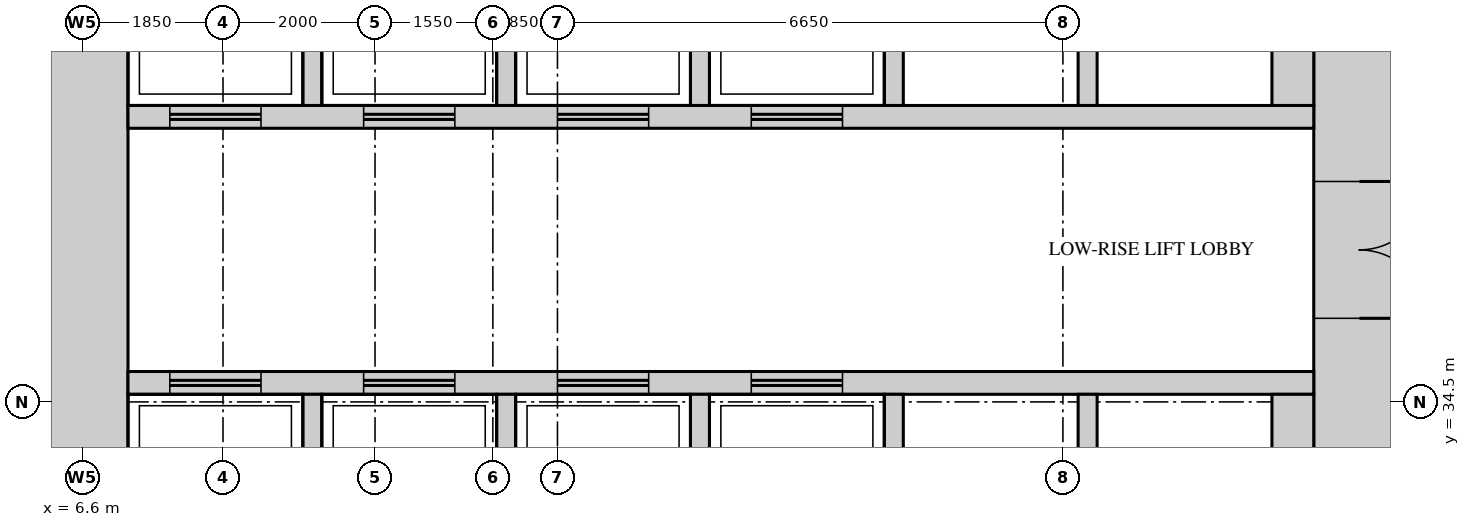
"""IFC4 building model, lengths in metres.
Left out: names, types, materials, properties, quantities, classifications, styles, units other than length and angle.
Written with IfcOpenShell. Run it as: python <this file> out.ifc"""

import sys

from ifc_helpers import new_model, si_unit, direction, frame, frame_2d, origin, place, context, subcontext, project, spatial, rectangle, extrude, source, transform, mapped, element, fill, save


model = new_model("IFC4")
c1 = context("Model", 3, precision=1e-05, world=origin(), true_north=direction((0.0, 1.0)))
c2 = subcontext(c1, "Body", "Model", "MODEL_VIEW")
j1 = project(units=[si_unit("LENGTHUNIT", "METRE"), si_unit("PLANEANGLEUNIT", "RADIAN")], contexts=[c1])
p1 = place(None, origin())
s1 = spatial("IfcSite", under=j1, at=p1, CompositionType="ELEMENT")
p2 = place(p1, origin())
s2 = spatial("IfcBuilding", under=s1, at=p2, CompositionType="ELEMENT")
p3 = place(p2, frame((0.0, 0.0, 33.0)))
s3 = spatial("IfcBuildingStorey", under=s2, at=p3, CompositionType="ELEMENT", Elevation=33.0)
m1 = source(origin(), c2, "Body", "SweptSolid", [
    extrude(rectangle(XDim=27.6, YDim=1.2, at=frame_2d((13.8, 0.0))), origin(), (0.0, 0.0, 1.0), 4.2),
])
p4 = place(p3, frame((23.4, 13.2, 0.0), z_axis=(0.0, 0.0, 1.0), x_axis=(0.0, 1.0, 0.0)))
e1 = element("IfcWall", 1, at=p4, inside=s3, PredefinedType="SHEAR", context=c2, shape_type="MappedRepresentation", body=[
    mapped(m1, transform((0.0, 0.0, 0.0))),
])
m2 = source(origin(), c2, "Body", "SweptSolid", [
    extrude(rectangle(XDim=1.8, YDim=2.1, at=frame_2d((0.9, 1.05))), frame((0.0, 0.61, 0.0), z_axis=(0.0, -1.0, 0.0), x_axis=(1.0, 0.0, 0.0)), (0.0, 0.0, 1.0), 1.22),
])
p5 = place(p4, frame((22.4, 0.0, 0.0)))
e2 = element("IfcOpeningElement", 2, at=p5, cuts=e1, PredefinedType="OPENING", context=c2, shape_type="MappedRepresentation", body=[
    mapped(m2, transform((0.0, 0.0, 0.0))),
])
m3 = source(origin(), c2, "Body", "SweptSolid", [
    extrude(rectangle(XDim=1.2, YDim=2.1, at=frame_2d((0.6, 1.05))), frame((0.0, 0.61, 0.0), z_axis=(0.0, -1.0, 0.0), x_axis=(1.0, 0.0, 0.0)), (0.0, 0.0, 1.0), 1.22),
])
p6 = place(p4, frame((13.65, 0.0, 0.0)))
e3 = element("IfcOpeningElement", 3, at=p6, cuts=e1, PredefinedType="OPENING", context=c2, shape_type="MappedRepresentation", body=[
    mapped(m3, transform((0.0, 0.0, 0.0))),
])
m4 = source(origin(), c2, "Body", "SweptSolid", [
    extrude(rectangle(XDim=0.9, YDim=2.1, at=frame_2d((0.45, 1.05))), frame((0.0, 0.61, 0.0), z_axis=(0.0, -1.0, 0.0), x_axis=(1.0, 0.0, 0.0)), (0.0, 0.0, 1.0), 1.22),
])
p7 = place(p4, frame((1.95, 0.0, 0.0)))
e4 = element("IfcOpeningElement", 4, at=p7, cuts=e1, PredefinedType="OPENING", context=c2, shape_type="MappedRepresentation", body=[
    mapped(m4, transform((0.0, 0.0, 0.0))),
])
p8 = place(p4, frame((6.8, 0.0, 0.0)))
e5 = element("IfcOpeningElement", 5, at=p8, cuts=e1, PredefinedType="OPENING", context=c2, shape_type="MappedRepresentation", body=[
    mapped(m4, transform((0.0, 0.0, 0.0))),
])
p9 = place(p3, frame((6.6, 13.2, 0.0), z_axis=(0.0, 0.0, 1.0), x_axis=(0.0, 1.0, 0.0)))
e6 = element("IfcWall", 6, at=p9, inside=s3, PredefinedType="SHEAR", context=c2, shape_type="MappedRepresentation", body=[
    mapped(m1, transform((0.0, 0.0, 0.0))),
])
m5 = source(origin(), c2, "Body", "SweptSolid", [
    extrude(rectangle(XDim=15.6, YDim=0.3, at=frame_2d((7.8, 0.0))), origin(), (0.0, 0.0, 1.0), 4.2),
])
p10 = place(p3, frame((7.2, 38.25, 0.0), z_axis=(0.0, 0.0, 1.0), x_axis=(1.0, 0.0, 0.0)))
e7 = element("IfcWall", 7, at=p10, inside=s3, PredefinedType="STANDARD", context=c2, shape_type="MappedRepresentation", body=[
    mapped(m5, transform((0.0, 0.0, 0.0))),
])
m6 = source(origin(), c2, "Body", "SweptSolid", [
    extrude(rectangle(XDim=1.2, YDim=2.1, at=frame_2d((0.6, 1.05))), frame((0.0, 0.16, 0.0), z_axis=(0.0, -1.0, 0.0), x_axis=(1.0, 0.0, 0.0)), (0.0, 0.0, 1.0), 0.32),
])
p11 = place(p10, frame((0.55, 0.0, 0.0)))
e8 = element("IfcOpeningElement", 8, at=p11, cuts=e7, PredefinedType="OPENING", context=c2, shape_type="MappedRepresentation", body=[
    mapped(m6, transform((0.0, 0.0, 0.0))),
])
p12 = place(p10, frame((3.1, 0.0, 0.0)))
e9 = element("IfcOpeningElement", 9, at=p12, cuts=e7, PredefinedType="OPENING", context=c2, shape_type="MappedRepresentation", body=[
    mapped(m6, transform((0.0, 0.0, 0.0))),
])
p13 = place(p10, frame((5.65, 0.0, 0.0)))
e10 = element("IfcOpeningElement", 10, at=p13, cuts=e7, PredefinedType="OPENING", context=c2, shape_type="MappedRepresentation", body=[
    mapped(m6, transform((0.0, 0.0, 0.0))),
])
p14 = place(p10, frame((8.2, 0.0, 0.0)))
e11 = element("IfcOpeningElement", 11, at=p14, cuts=e7, PredefinedType="OPENING", context=c2, shape_type="MappedRepresentation", body=[
    mapped(m6, transform((0.0, 0.0, 0.0))),
])
p15 = place(p3, frame((7.2, 34.75, 0.0), z_axis=(0.0, 0.0, 1.0), x_axis=(1.0, 0.0, 0.0)))
e12 = element("IfcWall", 12, at=p15, inside=s3, PredefinedType="STANDARD", context=c2, shape_type="MappedRepresentation", body=[
    mapped(m5, transform((0.0, 0.0, 0.0))),
])
p16 = place(p15, frame((0.55, 0.0, 0.0)))
e13 = element("IfcOpeningElement", 13, at=p16, cuts=e12, PredefinedType="OPENING", context=c2, shape_type="MappedRepresentation", body=[
    mapped(m6, transform((0.0, 0.0, 0.0))),
])
p17 = place(p15, frame((3.1, 0.0, 0.0)))
e14 = element("IfcOpeningElement", 14, at=p17, cuts=e12, PredefinedType="OPENING", context=c2, shape_type="MappedRepresentation", body=[
    mapped(m6, transform((0.0, 0.0, 0.0))),
])
p18 = place(p15, frame((5.65, 0.0, 0.0)))
e15 = element("IfcOpeningElement", 15, at=p18, cuts=e12, PredefinedType="OPENING", context=c2, shape_type="MappedRepresentation", body=[
    mapped(m6, transform((0.0, 0.0, 0.0))),
])
p19 = place(p15, frame((8.2, 0.0, 0.0)))
e16 = element("IfcOpeningElement", 16, at=p19, cuts=e12, PredefinedType="OPENING", context=c2, shape_type="MappedRepresentation", body=[
    mapped(m6, transform((0.0, 0.0, 0.0))),
])
m7 = source(origin(), c2, "Body", "SweptSolid", [
    extrude(rectangle(XDim=2.4, YDim=0.25, at=frame_2d((1.2, 0.0))), origin(), (0.0, 0.0, 1.0), 4.2),
])
for number, where, z_axis, x_axis in (
    (17, (9.625, 38.4, 0.0), (0.0, 0.0, 1.0), (0.0, 1.0, 0.0)),
    (18, (12.175, 38.4, 0.0), (0.0, 0.0, 1.0), (0.0, 1.0, 0.0)),
    (19, (14.725, 38.4, 0.0), (0.0, 0.0, 1.0), (0.0, 1.0, 0.0)),
    (20, (17.275, 38.4, 0.0), (0.0, 0.0, 1.0), (0.0, 1.0, 0.0)),
    (21, (19.825, 38.4, 0.0), (0.0, 0.0, 1.0), (0.0, 1.0, 0.0)),
):
    element("IfcWall", number, at=place(p3, frame(where, z_axis=z_axis, x_axis=x_axis)), inside=s3, PredefinedType="STANDARD", context=c2, shape_type="MappedRepresentation", body=[
        mapped(m7, transform((0.0, 0.0, 0.0))),
    ])
m8 = source(origin(), c2, "Body", "SweptSolid", [
    extrude(rectangle(XDim=2.4, YDim=0.55, at=frame_2d((1.2, 0.0))), origin(), (0.0, 0.0, 1.0), 4.2),
])
p20 = place(p3, frame((22.525, 38.4, 0.0), z_axis=(0.0, 0.0, 1.0), x_axis=(0.0, 1.0, 0.0)))
e22 = element("IfcWall", 22, at=p20, inside=s3, PredefinedType="STANDARD", context=c2, shape_type="MappedRepresentation", body=[
    mapped(m8, transform((0.0, 0.0, 0.0))),
])
for number, where, z_axis, x_axis in (
    (23, (9.625, 32.2, 0.0), (0.0, 0.0, 1.0), (0.0, 1.0, 0.0)),
    (24, (12.175, 32.2, 0.0), (0.0, 0.0, 1.0), (0.0, 1.0, 0.0)),
    (25, (14.725, 32.2, 0.0), (0.0, 0.0, 1.0), (0.0, 1.0, 0.0)),
    (26, (17.275, 32.2, 0.0), (0.0, 0.0, 1.0), (0.0, 1.0, 0.0)),
    (27, (19.825, 32.2, 0.0), (0.0, 0.0, 1.0), (0.0, 1.0, 0.0)),
):
    element("IfcWall", number, at=place(p3, frame(where, z_axis=z_axis, x_axis=x_axis)), inside=s3, PredefinedType="STANDARD", context=c2, shape_type="MappedRepresentation", body=[
        mapped(m7, transform((0.0, 0.0, 0.0))),
    ])
p21 = place(p3, frame((22.525, 32.2, 0.0), z_axis=(0.0, 0.0, 1.0), x_axis=(0.0, 1.0, 0.0)))
e28 = element("IfcWall", 28, at=p21, inside=s3, PredefinedType="STANDARD", context=c2, shape_type="MappedRepresentation", body=[
    mapped(m8, transform((0.0, 0.0, 0.0))),
])
m9 = source(origin(), c2, "Body", "SweptSolid", [
    extrude(rectangle(XDim=1.8, YDim=2.1, at=frame_2d((0.9, 1.05))), frame((0.0, 0.55, 0.0), z_axis=(0.0, -1.0, 0.0), x_axis=(1.0, 0.0, 0.0)), (0.0, 0.0, 1.0), 1.1),
])
p22 = place(p5, origin())
e29 = element("IfcDoor", 29, at=p22, inside=s3, OperationType="DOUBLE_DOOR_SINGLE_SWING", PredefinedType="DOOR", context=c2, shape_type="MappedRepresentation", body=[
    mapped(m9, transform((0.0, 0.0, 0.0))),
])
fill(e2, e29)
m10 = source(origin(), c2, "Body", "SweptSolid", [
    extrude(rectangle(XDim=1.2, YDim=2.1, at=frame_2d((0.6, 1.05))), frame((0.0, 0.025, 0.0), z_axis=(0.0, -1.0, 0.0), x_axis=(1.0, 0.0, 0.0)), (0.0, 0.0, 1.0), 0.05),
])
p23 = place(p16, origin())
e30 = element("IfcDoor", 30, at=p23, inside=s3, OperationType="DOUBLE_DOOR_SLIDING", PredefinedType="DOOR", context=c2, shape_type="MappedRepresentation", body=[
    mapped(m10, transform((0.0, 0.0, 0.0))),
])
fill(e13, e30)
p24 = place(p17, origin())
e31 = element("IfcDoor", 31, at=p24, inside=s3, OperationType="DOUBLE_DOOR_SLIDING", PredefinedType="DOOR", context=c2, shape_type="MappedRepresentation", body=[
    mapped(m10, transform((0.0, 0.0, 0.0))),
])
fill(e14, e31)
p25 = place(p18, origin())
e32 = element("IfcDoor", 32, at=p25, inside=s3, OperationType="DOUBLE_DOOR_SLIDING", PredefinedType="DOOR", context=c2, shape_type="MappedRepresentation", body=[
    mapped(m10, transform((0.0, 0.0, 0.0))),
])
fill(e15, e32)
p26 = place(p19, origin())
e33 = element("IfcDoor", 33, at=p26, inside=s3, OperationType="DOUBLE_DOOR_SLIDING", PredefinedType="DOOR", context=c2, shape_type="MappedRepresentation", body=[
    mapped(m10, transform((0.0, 0.0, 0.0))),
])
fill(e16, e33)
p27 = place(p11, origin())
e34 = element("IfcDoor", 34, at=p27, inside=s3, OperationType="DOUBLE_DOOR_SLIDING", PredefinedType="DOOR", context=c2, shape_type="MappedRepresentation", body=[
    mapped(m10, transform((0.0, 0.0, 0.0))),
])
fill(e8, e34)
p28 = place(p12, origin())
e35 = element("IfcDoor", 35, at=p28, inside=s3, OperationType="DOUBLE_DOOR_SLIDING", PredefinedType="DOOR", context=c2, shape_type="MappedRepresentation", body=[
    mapped(m10, transform((0.0, 0.0, 0.0))),
])
fill(e9, e35)
p29 = place(p13, origin())
e36 = element("IfcDoor", 36, at=p29, inside=s3, OperationType="DOUBLE_DOOR_SLIDING", PredefinedType="DOOR", context=c2, shape_type="MappedRepresentation", body=[
    mapped(m10, transform((0.0, 0.0, 0.0))),
])
fill(e10, e36)
p30 = place(p14, origin())
e37 = element("IfcDoor", 37, at=p30, inside=s3, OperationType="DOUBLE_DOOR_SLIDING", PredefinedType="DOOR", context=c2, shape_type="MappedRepresentation", body=[
    mapped(m10, transform((0.0, 0.0, 0.0))),
])
fill(e11, e37)
save(model, sys.argv[1])
